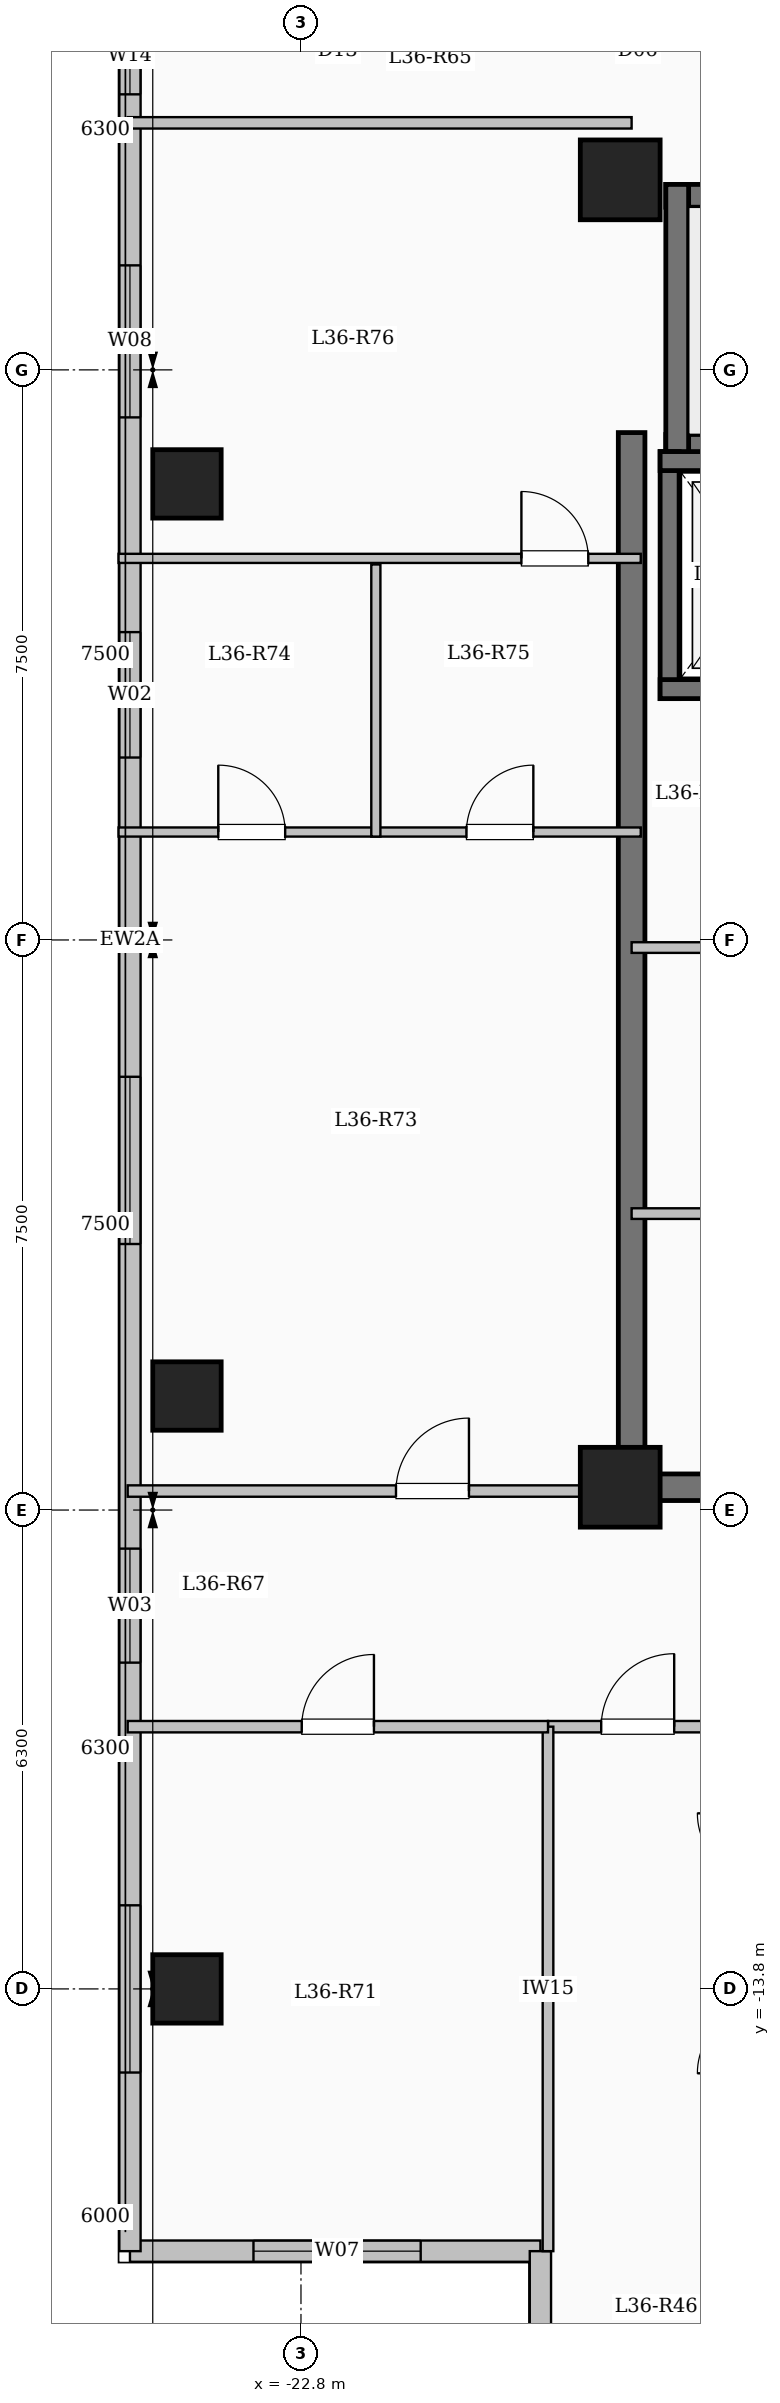
"""IFC4 building model, lengths in metres.
Left out: names, types, materials, properties, quantities, classifications, styles, units other than length and angle.
Written with IfcOpenShell. Run it as: python <this file> out.ifc"""

import sys

from ifc_helpers import new_model, si_unit, direction, frame, frame_2d, origin, origin_2d, place, context, subcontext, project, spatial, rectangle, extrude, element, fill, save


model = new_model("IFC4")
c1 = context("Model", 3, precision=1e-05, world=origin(), true_north=direction((0.0, 1.0)))
c2 = subcontext(c1, "Body", "Model", "MODEL_VIEW")
j1 = project(units=[si_unit("LENGTHUNIT", "METRE"), si_unit("PLANEANGLEUNIT", "RADIAN")], contexts=[c1])
p1 = place(None, origin())
s1 = spatial("IfcSite", under=j1, at=p1, CompositionType="ELEMENT")
p2 = place(p1, origin())
s2 = spatial("IfcBuilding", under=s1, at=p2, CompositionType="ELEMENT")
p3 = place(p2, frame((0.0, 0.0, 135.95)))
s3 = spatial("IfcBuildingStorey", under=s2, at=p3, CompositionType="ELEMENT", Elevation=135.95)
for number, where, z_axis, x_axis in (
    (1, (-18.6, -7.2, 0.0), (0.0, 0.0, 1.0), (1.0, 0.0, 0.0)),
    (2, (-18.6, 10.0, 0.0), (0.0, 0.0, 1.0), (1.0, 0.0, 0.0)),
):
    element("IfcColumn", number, at=place(p3, frame(where, z_axis=z_axis, x_axis=x_axis)), inside=s3, PredefinedType="COLUMN", context=c2, shape_type="SweptSolid", body=[
        extrude(rectangle(XDim=1.05, YDim=1.05, at=origin_2d()), origin(), (0.0, 0.0, 1.0), 3.35),
    ])
for number, where, z_axis, x_axis in (
    (3, (-24.3, -13.8, 0.0), (0.0, 0.0, 1.0), (1.0, 0.0, 0.0)),
    (4, (-24.3, -6.0, 0.0), (0.0, 0.0, 1.0), (1.0, 0.0, 0.0)),
    (5, (-24.3, 6.0, 0.0), (0.0, 0.0, 1.0), (1.0, 0.0, 0.0)),
):
    element("IfcColumn", number, at=place(p3, frame(where, z_axis=z_axis, x_axis=x_axis)), inside=s3, PredefinedType="COLUMN", context=c2, shape_type="SweptSolid", body=[
        extrude(rectangle(XDim=0.9, YDim=0.9, at=origin_2d()), origin(), (0.0, 0.0, 1.0), 3.35),
    ])
p4 = place(p3, frame((-19.65, -17.25, 0.0), z_axis=(0.0, 0.0, 1.0), x_axis=(-1.0, 0.0, 0.0)))
e6 = element("IfcWall", 6, at=p4, inside=s3, PredefinedType="SOLIDWALL", context=c2, shape_type="SweptSolid", body=[
    extrude(rectangle(XDim=5.4, YDim=0.28, at=frame_2d((2.7, 0.0))), origin(), (0.0, 0.0, 1.0), 3.1),
])
p5 = place(p4, frame((1.575, 0.0, 0.9)))
e7 = element("IfcOpeningElement", 7, at=p5, cuts=e6, PredefinedType="OPENING", context=c2, shape_type="SweptSolid", body=[
    extrude(rectangle(XDim=2.2, YDim=1.75, at=frame_2d((1.1, 0.875))), frame((0.0, 0.15, 0.0), z_axis=(0.0, -1.0, 0.0), x_axis=(1.0, 0.0, 0.0)), (0.0, 0.0, 1.0), 0.3),
])
p6 = place(p3, frame((-25.05, -17.25, 0.0), z_axis=(0.0, 0.0, 1.0), x_axis=(0.0, 1.0, 0.0)))
e8 = element("IfcWall", 8, at=p6, inside=s3, PredefinedType="SOLIDWALL", context=c2, shape_type="SweptSolid", body=[
    extrude(rectangle(XDim=34.5, YDim=0.28, at=frame_2d((17.25, 0.0))), origin(), (0.0, 0.0, 1.0), 3.1),
])
p7 = place(p6, frame((2.35, 0.0, 0.9)))
e9 = element("IfcOpeningElement", 9, at=p7, cuts=e8, PredefinedType="OPENING", context=c2, shape_type="SweptSolid", body=[
    extrude(rectangle(XDim=2.2, YDim=1.75, at=frame_2d((1.1, 0.875))), frame((0.0, 0.15, 0.0), z_axis=(0.0, -1.0, 0.0), x_axis=(1.0, 0.0, 0.0)), (0.0, 0.0, 1.0), 0.3),
])
p8 = place(p6, frame((7.742, 0.0, 0.9)))
e10 = element("IfcOpeningElement", 10, at=p8, cuts=e8, PredefinedType="OPENING", context=c2, shape_type="SweptSolid", body=[
    extrude(rectangle(XDim=1.5, YDim=1.65, at=frame_2d((0.75, 0.825))), frame((0.0, 0.15, 0.0), z_axis=(0.0, -1.0, 0.0), x_axis=(1.0, 0.0, 0.0)), (0.0, 0.0, 1.0), 0.3),
])
p9 = place(p6, frame((13.25, 0.0, 0.9)))
e11 = element("IfcOpeningElement", 11, at=p9, cuts=e8, PredefinedType="OPENING", context=c2, shape_type="SweptSolid", body=[
    extrude(rectangle(XDim=2.2, YDim=1.75, at=frame_2d((1.1, 0.875))), frame((0.0, 0.15, 0.0), z_axis=(0.0, -1.0, 0.0), x_axis=(1.0, 0.0, 0.0)), (0.0, 0.0, 1.0), 0.3),
])
p10 = place(p6, frame((19.65, 0.0, 0.9)))
e12 = element("IfcOpeningElement", 12, at=p10, cuts=e8, PredefinedType="OPENING", context=c2, shape_type="SweptSolid", body=[
    extrude(rectangle(XDim=1.65, YDim=1.6, at=frame_2d((0.825, 0.8))), frame((0.0, 0.15, 0.0), z_axis=(0.0, -1.0, 0.0), x_axis=(1.0, 0.0, 0.0)), (0.0, 0.0, 1.0), 0.3),
])
p11 = place(p6, frame((24.125, 0.0, 0.9)))
e13 = element("IfcOpeningElement", 13, at=p11, cuts=e8, PredefinedType="OPENING", context=c2, shape_type="SweptSolid", body=[
    extrude(rectangle(XDim=2.0, YDim=1.7, at=frame_2d((1.0, 0.85))), frame((0.0, 0.15, 0.0), z_axis=(0.0, -1.0, 0.0), x_axis=(1.0, 0.0, 0.0)), (0.0, 0.0, 1.0), 0.3),
])
p12 = place(p6, frame((28.375, 0.0, 0.95)))
e14 = element("IfcOpeningElement", 14, at=p12, cuts=e8, PredefinedType="OPENING", context=c2, shape_type="SweptSolid", body=[
    extrude(rectangle(XDim=1.0, YDim=1.5, at=frame_2d((0.5, 0.75))), frame((0.0, 0.15, 0.0), z_axis=(0.0, -1.0, 0.0), x_axis=(1.0, 0.0, 0.0)), (0.0, 0.0, 1.0), 0.3),
])
p13 = place(p6, frame((31.125, 0.0, 0.9)))
e15 = element("IfcOpeningElement", 15, at=p13, cuts=e8, PredefinedType="OPENING", context=c2, shape_type="SweptSolid", body=[
    extrude(rectangle(XDim=2.0, YDim=1.7, at=frame_2d((1.0, 0.85))), frame((0.0, 0.15, 0.0), z_axis=(0.0, -1.0, 0.0), x_axis=(1.0, 0.0, 0.0)), (0.0, 0.0, 1.0), 0.3),
])
p14 = place(p3, frame((-19.65, -21.15, 0.0), z_axis=(0.0, 0.0, 1.0), x_axis=(0.0, 1.0, 0.0)))
e16 = element("IfcWall", 16, at=p14, inside=s3, PredefinedType="SOLIDWALL", context=c2, shape_type="SweptSolid", body=[
    extrude(rectangle(XDim=3.9, YDim=0.28, at=frame_2d((1.95, 0.0))), origin(), (0.0, 0.0, 1.0), 3.1),
])
p15 = place(p14, frame((1.143, 0.0, 0.9)))
e17 = element("IfcOpeningElement", 17, at=p15, cuts=e16, PredefinedType="OPENING", context=c2, shape_type="SweptSolid", body=[
    extrude(rectangle(XDim=1.65, YDim=1.6, at=frame_2d((0.825, 0.8))), frame((0.0, 0.15, 0.0), z_axis=(0.0, -1.0, 0.0), x_axis=(1.0, 0.0, 0.0)), (0.0, 0.0, 1.0), 0.3),
])
p16 = place(p3, frame((-18.0, 9.79, 0.0), z_axis=(0.0, 0.0, 1.0), x_axis=(1.0, 0.0, 0.0)))
e18 = element("IfcWall", 18, at=p16, inside=s3, PredefinedType="SHEAR", context=c2, shape_type="SweptSolid", body=[
    extrude(rectangle(XDim=8.0, YDim=0.3, at=frame_2d((4.0, 0.0))), origin(), (0.0, 0.0, 1.0), 3.35),
])
p17 = place(p3, frame((-18.0, 6.5, 0.0), z_axis=(0.0, 0.0, 1.0), x_axis=(1.0, 0.0, 0.0)))
e19 = element("IfcWall", 19, at=p17, inside=s3, PredefinedType="SHEAR", context=c2, shape_type="SweptSolid", body=[
    extrude(rectangle(XDim=8.0, YDim=0.3, at=frame_2d((4.0, 0.0))), origin(), (0.0, 0.0, 1.0), 3.35),
])
p18 = place(p17, frame((6.45, 0.0, 0.0)))
e20 = element("IfcOpeningElement", 20, at=p18, cuts=e19, PredefinedType="OPENING", context=c2, shape_type="SweptSolid", body=[
    extrude(rectangle(XDim=1.0, YDim=2.15, at=frame_2d((0.5, 1.075))), frame((0.0, 0.16, 0.0), z_axis=(0.0, -1.0, 0.0), x_axis=(1.0, 0.0, 0.0)), (0.0, 0.0, 1.0), 0.32),
])
p19 = place(p3, frame((-17.85, 6.35, 0.0), z_axis=(0.0, 0.0, 1.0), x_axis=(0.0, 1.0, 0.0)))
e21 = element("IfcWall", 21, at=p19, inside=s3, PredefinedType="SHEAR", context=c2, shape_type="SweptSolid", body=[
    extrude(rectangle(XDim=3.59, YDim=0.3, at=frame_2d((1.795, 0.0))), origin(), (0.0, 0.0, 1.0), 3.35),
])
p20 = place(p3, frame((-17.95, 3.175, 0.0), z_axis=(0.0, 0.0, 1.0), x_axis=(0.0, 1.0, 0.0)))
e22 = element("IfcWall", 22, at=p20, inside=s3, PredefinedType="SHEAR", context=c2, shape_type="SweptSolid", body=[
    extrude(rectangle(XDim=3.25, YDim=0.25, at=frame_2d((1.625, 0.0))), origin(), (0.0, 0.0, 1.0), 3.35),
])
for number, where, z_axis, x_axis in (
    (23, (-18.075, 3.3, 0.0), (0.0, 0.0, 1.0), (1.0, 0.0, 0.0)),
    (24, (-18.075, 6.3, 0.0), (0.0, 0.0, 1.0), (1.0, 0.0, 0.0)),
):
    element("IfcWall", number, at=place(p3, frame(where, z_axis=z_axis, x_axis=x_axis)), inside=s3, PredefinedType="SHEAR", context=c2, shape_type="SweptSolid", body=[
        extrude(rectangle(XDim=2.55, YDim=0.25, at=frame_2d((1.275, 0.0))), origin(), (0.0, 0.0, 1.0), 3.35),
    ])
p21 = place(p3, frame((-18.45, -7.375, 0.0), z_axis=(0.0, 0.0, 1.0), x_axis=(0.0, 1.0, 0.0)))
e25 = element("IfcWall", 25, at=p21, inside=s3, PredefinedType="SHEAR", context=c2, shape_type="SweptSolid", body=[
    extrude(rectangle(XDim=14.05, YDim=0.35, at=frame_2d((7.025, 0.0))), origin(), (0.0, 0.0, 1.0), 3.35),
])
p22 = place(p3, frame((-18.625, -7.2, 0.0), z_axis=(0.0, 0.0, 1.0), x_axis=(1.0, 0.0, 0.0)))
e26 = element("IfcWall", 26, at=p22, inside=s3, PredefinedType="SHEAR", context=c2, shape_type="SweptSolid", body=[
    extrude(rectangle(XDim=8.55, YDim=0.35, at=frame_2d((4.275, 0.0))), origin(), (0.0, 0.0, 1.0), 3.35),
])
p23 = place(p3, frame((-18.45, -3.6, 0.0), z_axis=(0.0, 0.0, 1.0), x_axis=(1.0, 0.0, 0.0)))
e27 = element("IfcWall", 27, at=p23, inside=s3, PredefinedType="PARTITIONING", context=c2, shape_type="SweptSolid", body=[
    extrude(rectangle(XDim=3.05, YDim=0.14, at=frame_2d((1.525, 0.0))), origin(), (0.0, 0.0, 1.0), 3.1),
])
p24 = place(p23, frame((1.05, 0.0, 0.0)))
e28 = element("IfcOpeningElement", 28, at=p24, cuts=e27, PredefinedType="OPENING", context=c2, shape_type="SweptSolid", body=[
    extrude(rectangle(XDim=0.9, YDim=2.08, at=frame_2d((0.45, 1.04))), frame((0.0, 0.08, 0.0), z_axis=(0.0, -1.0, 0.0), x_axis=(1.0, 0.0, 0.0)), (0.0, 0.0, 1.0), 0.16),
])
p25 = place(p3, frame((-18.45, -0.1, 0.0), z_axis=(0.0, 0.0, 1.0), x_axis=(1.0, 0.0, 0.0)))
e29 = element("IfcWall", 29, at=p25, inside=s3, PredefinedType="PARTITIONING", context=c2, shape_type="SweptSolid", body=[
    extrude(rectangle(XDim=3.05, YDim=0.14, at=frame_2d((1.525, 0.0))), origin(), (0.0, 0.0, 1.0), 3.1),
])
p26 = place(p25, frame((1.05, 0.0, 0.0)))
e30 = element("IfcOpeningElement", 30, at=p26, cuts=e29, PredefinedType="OPENING", context=c2, shape_type="SweptSolid", body=[
    extrude(rectangle(XDim=0.9, YDim=2.08, at=frame_2d((0.45, 1.04))), frame((0.0, 0.08, 0.0), z_axis=(0.0, -1.0, 0.0), x_axis=(1.0, 0.0, 0.0)), (0.0, 0.0, 1.0), 0.16),
])
p27 = place(p3, frame((-19.55, -10.35, 0.0), z_axis=(0.0, 0.0, 1.0), x_axis=(1.0, 0.0, 0.0)))
e31 = element("IfcWall", 31, at=p27, inside=s3, PredefinedType="PARTITIONING", context=c2, shape_type="SweptSolid", body=[
    extrude(rectangle(XDim=11.0, YDim=0.15, at=frame_2d((5.5, 0.0))), origin(), (0.0, 0.0, 1.0), 3.1),
])
p28 = place(p27, frame((0.7, 0.0, 0.0)))
e32 = element("IfcOpeningElement", 32, at=p28, cuts=e31, PredefinedType="OPENING", context=c2, shape_type="SweptSolid", body=[
    extrude(rectangle(XDim=0.96, YDim=2.15, at=frame_2d((0.48, 1.075))), frame((0.0, 0.085, 0.0), z_axis=(0.0, -1.0, 0.0), x_axis=(1.0, 0.0, 0.0)), (0.0, 0.0, 1.0), 0.17),
])
p29 = place(p27, frame((6.175, 0.0, 0.0)))
e33 = element("IfcOpeningElement", 33, at=p29, cuts=e31, PredefinedType="OPENING", context=c2, shape_type="SweptSolid", body=[
    extrude(rectangle(XDim=0.96, YDim=2.15, at=frame_2d((0.48, 1.075))), frame((0.0, 0.085, 0.0), z_axis=(0.0, -1.0, 0.0), x_axis=(1.0, 0.0, 0.0)), (0.0, 0.0, 1.0), 0.17),
])
p30 = place(p3, frame((-25.08, -7.25, 0.0), z_axis=(0.0, 0.0, 1.0), x_axis=(1.0, 0.0, 0.0)))
e34 = element("IfcWall", 34, at=p30, inside=s3, PredefinedType="PARTITIONING", context=c2, shape_type="SweptSolid", body=[
    extrude(rectangle(XDim=6.63, YDim=0.15, at=frame_2d((3.315, 0.0))), origin(), (0.0, 0.0, 1.0), 3.1),
])
p31 = place(p30, frame((3.53, 0.0, 0.0)))
e35 = element("IfcOpeningElement", 35, at=p31, cuts=e34, PredefinedType="OPENING", context=c2, shape_type="SweptSolid", body=[
    extrude(rectangle(XDim=0.96, YDim=2.15, at=frame_2d((0.48, 1.075))), frame((0.0, 0.085, 0.0), z_axis=(0.0, -1.0, 0.0), x_axis=(1.0, 0.0, 0.0)), (0.0, 0.0, 1.0), 0.17),
])
p32 = place(p3, frame((-25.08, 10.75, 0.0), z_axis=(0.0, 0.0, 1.0), x_axis=(1.0, 0.0, 0.0)))
e36 = element("IfcWall", 36, at=p32, inside=s3, PredefinedType="PARTITIONING", context=c2, shape_type="SweptSolid", body=[
    extrude(rectangle(XDim=6.63, YDim=0.15, at=frame_2d((3.315, 0.0))), origin(), (0.0, 0.0, 1.0), 3.1),
])
p33 = place(p3, frame((-19.55, -17.25, 0.0), z_axis=(0.0, 0.0, 1.0), x_axis=(0.0, 1.0, 0.0)))
e37 = element("IfcWall", 37, at=p33, inside=s3, PredefinedType="PARTITIONING", context=c2, shape_type="SweptSolid", body=[
    extrude(rectangle(XDim=6.9, YDim=0.14, at=frame_2d((3.45, 0.0))), origin(), (0.0, 0.0, 1.0), 3.1),
])
p34 = place(p3, frame((-25.08, -10.35, 0.0), z_axis=(0.0, 0.0, 1.0), x_axis=(1.0, 0.0, 0.0)))
e38 = element("IfcWall", 38, at=p34, inside=s3, PredefinedType="PARTITIONING", context=c2, shape_type="SweptSolid", body=[
    extrude(rectangle(XDim=5.53, YDim=0.15, at=frame_2d((2.765, 0.0))), origin(), (0.0, 0.0, 1.0), 3.1),
])
p35 = place(p34, frame((2.29, 0.0, 0.0)))
e39 = element("IfcOpeningElement", 39, at=p35, cuts=e38, PredefinedType="OPENING", context=c2, shape_type="SweptSolid", body=[
    extrude(rectangle(XDim=0.95, YDim=2.15, at=frame_2d((0.475, 1.075))), frame((0.0, 0.085, 0.0), z_axis=(0.0, -1.0, 0.0), x_axis=(1.0, 0.0, 0.0)), (0.0, 0.0, 1.0), 0.17),
])
p36 = place(p3, frame((-25.2, 1.42, 0.0), z_axis=(0.0, 0.0, 1.0), x_axis=(1.0, 0.0, 0.0)))
e40 = element("IfcWall", 40, at=p36, inside=s3, PredefinedType="PARTITIONING", context=c2, shape_type="SweptSolid", body=[
    extrude(rectangle(XDim=6.87, YDim=0.12, at=frame_2d((3.435, 0.0))), origin(), (0.0, 0.0, 1.0), 3.1),
])
p37 = place(p36, frame((1.312, 0.0, 0.0)))
e41 = element("IfcOpeningElement", 41, at=p37, cuts=e40, PredefinedType="OPENING", context=c2, shape_type="SweptSolid", body=[
    extrude(rectangle(XDim=0.88, YDim=2.1, at=frame_2d((0.44, 1.05))), frame((0.0, 0.07, 0.0), z_axis=(0.0, -1.0, 0.0), x_axis=(1.0, 0.0, 0.0)), (0.0, 0.0, 1.0), 0.14),
])
p38 = place(p36, frame((4.577, 0.0, 0.0)))
e42 = element("IfcOpeningElement", 42, at=p38, cuts=e40, PredefinedType="OPENING", context=c2, shape_type="SweptSolid", body=[
    extrude(rectangle(XDim=0.88, YDim=2.1, at=frame_2d((0.44, 1.05))), frame((0.0, 0.07, 0.0), z_axis=(0.0, -1.0, 0.0), x_axis=(1.0, 0.0, 0.0)), (0.0, 0.0, 1.0), 0.14),
])
p39 = place(p3, frame((-25.2, 5.02, 0.0), z_axis=(0.0, 0.0, 1.0), x_axis=(1.0, 0.0, 0.0)))
e43 = element("IfcWall", 43, at=p39, inside=s3, PredefinedType="PARTITIONING", context=c2, shape_type="SweptSolid", body=[
    extrude(rectangle(XDim=6.87, YDim=0.12, at=frame_2d((3.435, 0.0))), origin(), (0.0, 0.0, 1.0), 3.1),
])
p40 = place(p39, frame((5.3, 0.0, 0.0)))
e44 = element("IfcOpeningElement", 44, at=p40, cuts=e43, PredefinedType="OPENING", context=c2, shape_type="SweptSolid", body=[
    extrude(rectangle(XDim=0.88, YDim=2.1, at=frame_2d((0.44, 1.05))), frame((0.0, 0.07, 0.0), z_axis=(0.0, -1.0, 0.0), x_axis=(1.0, 0.0, 0.0)), (0.0, 0.0, 1.0), 0.14),
])
p41 = place(p3, frame((-21.815, 1.36, 0.0), z_axis=(0.0, 0.0, 1.0), x_axis=(0.0, 1.0, 0.0)))
e45 = element("IfcWall", 45, at=p41, inside=s3, PredefinedType="PARTITIONING", context=c2, shape_type="SweptSolid", body=[
    extrude(rectangle(XDim=3.58, YDim=0.12, at=frame_2d((1.79, 0.0))), origin(), (0.0, 0.0, 1.0), 3.1),
])
p42 = place(p5, origin())
e46 = element("IfcWindow", 46, at=p42, inside=s3, PartitioningType="SINGLE_PANEL", PredefinedType="WINDOW", context=c2, shape_type="SweptSolid", body=[
    extrude(rectangle(XDim=2.2, YDim=1.75, at=frame_2d((1.1, 0.875))), frame((0.0, 0.03, 0.0), z_axis=(0.0, -1.0, 0.0), x_axis=(1.0, 0.0, 0.0)), (0.0, 0.0, 1.0), 0.06),
])
fill(e7, e46)
p43 = place(p7, origin())
e47 = element("IfcWindow", 47, at=p43, inside=s3, PartitioningType="SINGLE_PANEL", PredefinedType="WINDOW", context=c2, shape_type="SweptSolid", body=[
    extrude(rectangle(XDim=2.2, YDim=1.75, at=frame_2d((1.1, 0.875))), frame((0.0, 0.03, 0.0), z_axis=(0.0, -1.0, 0.0), x_axis=(1.0, 0.0, 0.0)), (0.0, 0.0, 1.0), 0.06),
])
fill(e9, e47)
p44 = place(p8, origin())
e48 = element("IfcWindow", 48, at=p44, inside=s3, PartitioningType="SINGLE_PANEL", PredefinedType="WINDOW", context=c2, shape_type="SweptSolid", body=[
    extrude(rectangle(XDim=1.5, YDim=1.65, at=frame_2d((0.75, 0.825))), frame((0.0, 0.03, 0.0), z_axis=(0.0, -1.0, 0.0), x_axis=(1.0, 0.0, 0.0)), (0.0, 0.0, 1.0), 0.06),
])
fill(e10, e48)
p45 = place(p9, origin())
e49 = element("IfcWindow", 49, at=p45, inside=s3, PartitioningType="SINGLE_PANEL", PredefinedType="WINDOW", context=c2, shape_type="SweptSolid", body=[
    extrude(rectangle(XDim=2.2, YDim=1.75, at=frame_2d((1.1, 0.875))), frame((0.0, 0.03, 0.0), z_axis=(0.0, -1.0, 0.0), x_axis=(1.0, 0.0, 0.0)), (0.0, 0.0, 1.0), 0.06),
])
fill(e11, e49)
p46 = place(p10, origin())
e50 = element("IfcWindow", 50, at=p46, inside=s3, PartitioningType="SINGLE_PANEL", PredefinedType="WINDOW", context=c2, shape_type="SweptSolid", body=[
    extrude(rectangle(XDim=1.65, YDim=1.6, at=frame_2d((0.825, 0.8))), frame((0.0, 0.03, 0.0), z_axis=(0.0, -1.0, 0.0), x_axis=(1.0, 0.0, 0.0)), (0.0, 0.0, 1.0), 0.06),
])
fill(e12, e50)
p47 = place(p11, origin())
e51 = element("IfcWindow", 51, at=p47, inside=s3, PartitioningType="SINGLE_PANEL", PredefinedType="WINDOW", context=c2, shape_type="SweptSolid", body=[
    extrude(rectangle(XDim=2.0, YDim=1.7, at=frame_2d((1.0, 0.85))), frame((0.0, 0.03, 0.0), z_axis=(0.0, -1.0, 0.0), x_axis=(1.0, 0.0, 0.0)), (0.0, 0.0, 1.0), 0.06),
])
fill(e13, e51)
p48 = place(p12, origin())
e52 = element("IfcWindow", 52, at=p48, inside=s3, PartitioningType="SINGLE_PANEL", PredefinedType="WINDOW", context=c2, shape_type="SweptSolid", body=[
    extrude(rectangle(XDim=1.0, YDim=1.5, at=frame_2d((0.5, 0.75))), frame((0.0, 0.03, 0.0), z_axis=(0.0, -1.0, 0.0), x_axis=(1.0, 0.0, 0.0)), (0.0, 0.0, 1.0), 0.06),
])
fill(e14, e52)
p49 = place(p28, origin())
e53 = element("IfcDoor", 53, at=p49, inside=s3, OperationType="SINGLE_SWING_RIGHT", PredefinedType="DOOR", context=c2, shape_type="SweptSolid", body=[
    extrude(rectangle(XDim=0.96, YDim=2.15, at=frame_2d((0.48, 1.075))), frame((0.0, 0.025, 0.0), z_axis=(0.0, -1.0, 0.0), x_axis=(1.0, 0.0, 0.0)), (0.0, 0.0, 1.0), 0.05),
])
fill(e32, e53)
p50 = place(p35, origin())
e54 = element("IfcDoor", 54, at=p50, inside=s3, OperationType="SINGLE_SWING_RIGHT", PredefinedType="DOOR", context=c2, shape_type="SweptSolid", body=[
    extrude(rectangle(XDim=0.95, YDim=2.15, at=frame_2d((0.475, 1.075))), frame((0.0, 0.025, 0.0), z_axis=(0.0, -1.0, 0.0), x_axis=(1.0, 0.0, 0.0)), (0.0, 0.0, 1.0), 0.05),
])
fill(e39, e54)
p51 = place(p31, origin())
e55 = element("IfcDoor", 55, at=p51, inside=s3, OperationType="SINGLE_SWING_RIGHT", PredefinedType="DOOR", context=c2, shape_type="SweptSolid", body=[
    extrude(rectangle(XDim=0.96, YDim=2.15, at=frame_2d((0.48, 1.075))), frame((0.0, 0.025, 0.0), z_axis=(0.0, -1.0, 0.0), x_axis=(1.0, 0.0, 0.0)), (0.0, 0.0, 1.0), 0.05),
])
fill(e35, e55)
p52 = place(p37, origin())
e56 = element("IfcDoor", 56, at=p52, inside=s3, OperationType="SINGLE_SWING_LEFT", PredefinedType="DOOR", context=c2, shape_type="SweptSolid", body=[
    extrude(rectangle(XDim=0.88, YDim=2.1, at=frame_2d((0.44, 1.05))), frame((0.0, 0.025, 0.0), z_axis=(0.0, -1.0, 0.0), x_axis=(1.0, 0.0, 0.0)), (0.0, 0.0, 1.0), 0.05),
])
fill(e41, e56)
p53 = place(p38, origin())
e57 = element("IfcDoor", 57, at=p53, inside=s3, OperationType="SINGLE_SWING_RIGHT", PredefinedType="DOOR", context=c2, shape_type="SweptSolid", body=[
    extrude(rectangle(XDim=0.88, YDim=2.1, at=frame_2d((0.44, 1.05))), frame((0.0, 0.025, 0.0), z_axis=(0.0, -1.0, 0.0), x_axis=(1.0, 0.0, 0.0)), (0.0, 0.0, 1.0), 0.05),
])
fill(e42, e57)
p54 = place(p40, origin())
e58 = element("IfcDoor", 58, at=p54, inside=s3, OperationType="SINGLE_SWING_LEFT", PredefinedType="DOOR", context=c2, shape_type="SweptSolid", body=[
    extrude(rectangle(XDim=0.88, YDim=2.1, at=frame_2d((0.44, 1.05))), frame((0.0, 0.025, 0.0), z_axis=(0.0, -1.0, 0.0), x_axis=(1.0, 0.0, 0.0)), (0.0, 0.0, 1.0), 0.05),
])
fill(e44, e58)
save(model, sys.argv[1])
